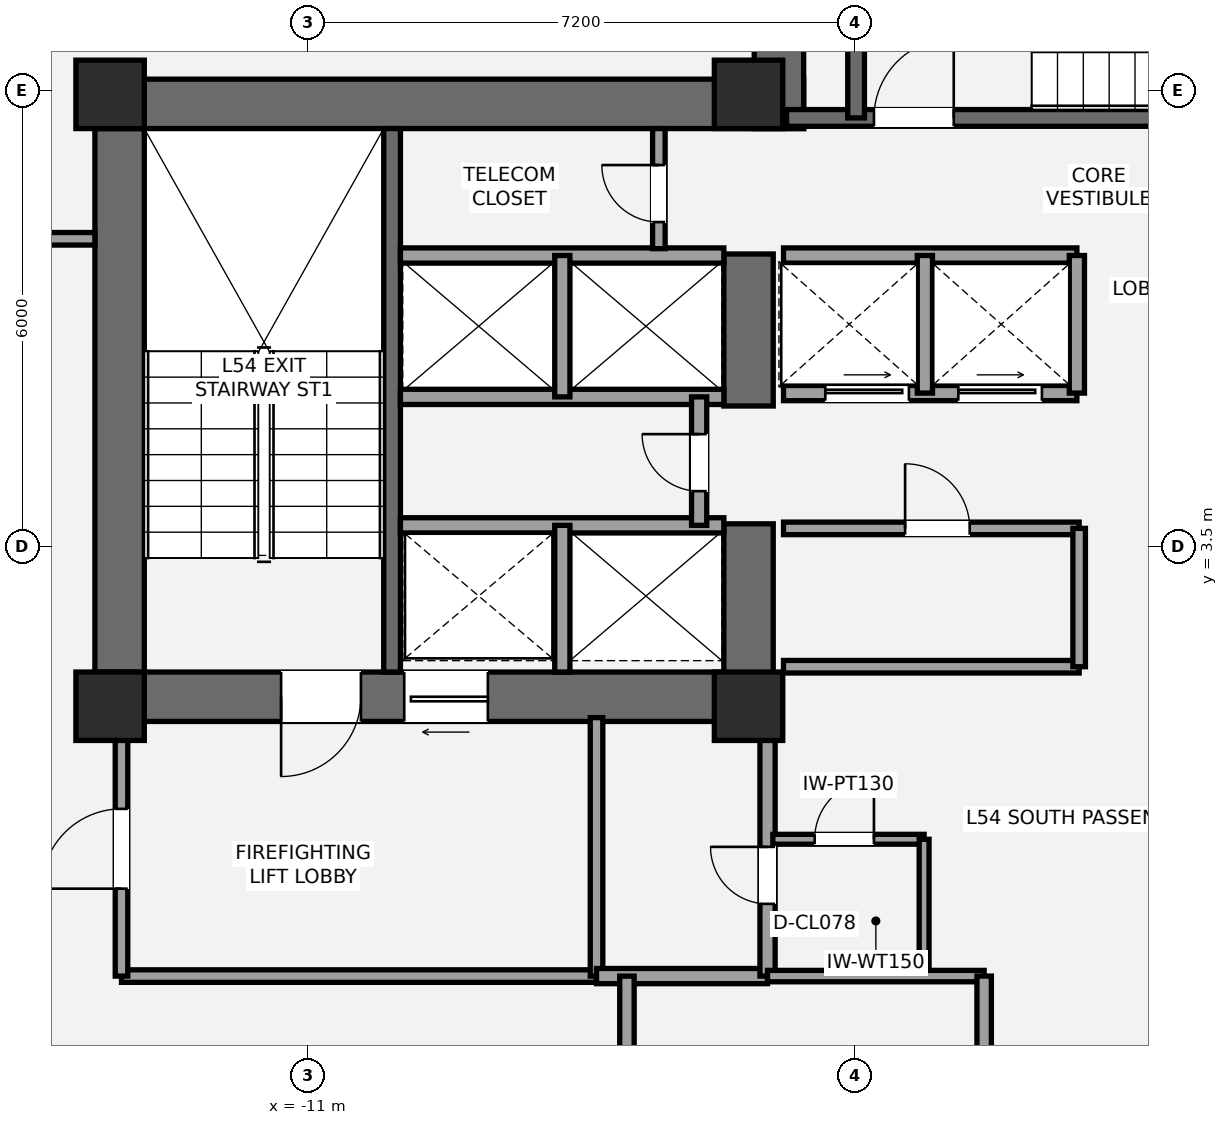
"""IFC4 building model, lengths in metres.
Left out: names, types, materials, properties, quantities, classifications, styles, units other than length and angle.
Written with IfcOpenShell. Run it as: python <this file> out.ifc"""

import sys

from ifc_helpers import new_model, si_unit, direction, frame, frame_2d, origin, origin_2d, place, context, subcontext, project, spatial, rectangle, extrude, element, fill, save


model = new_model("IFC4")
c1 = context("Model", 3, precision=1e-05, world=origin(), true_north=direction((0.0, 1.0)))
c2 = subcontext(c1, "Body", "Model", "MODEL_VIEW")
j1 = project(units=[si_unit("LENGTHUNIT", "METRE"), si_unit("PLANEANGLEUNIT", "RADIAN")], contexts=[c1])
p1 = place(None, origin())
s1 = spatial("IfcSite", under=j1, at=p1, CompositionType="ELEMENT")
p2 = place(p1, origin())
s2 = spatial("IfcBuilding", under=s1, at=p2, CompositionType="ELEMENT")
p3 = place(p2, frame((0.0, 0.0, 195.0)))
s3 = spatial("IfcBuildingStorey", under=s2, at=p3, CompositionType="ELEMENT", Elevation=195.0)
p4 = place(p3, frame((-13.475, 1.2, 0.0), z_axis=(0.0, 0.0, 1.0), x_axis=(0.0, 1.0, 0.0)))
e1 = element("IfcWall", 1, at=p4, inside=s3, PredefinedType="SHEAR", context=c2, shape_type="SweptSolid", body=[
    extrude(rectangle(XDim=8.45, YDim=0.65, at=frame_2d((4.225, 0.0))), origin(), (0.0, 0.0, 1.0), 3.2),
])
p5 = place(p3, frame((-13.8, 9.325, 0.0), z_axis=(0.0, 0.0, 1.0), x_axis=(1.0, 0.0, 0.0)))
e2 = element("IfcWall", 2, at=p5, inside=s3, PredefinedType="SHEAR", context=c2, shape_type="SweptSolid", body=[
    extrude(rectangle(XDim=9.325, YDim=0.65, at=frame_2d((4.663, 0.0))), origin(), (0.0, 0.0, 1.0), 3.2),
])
p6 = place(p3, frame((-4.875, 1.525, 0.0), z_axis=(0.0, 0.0, 1.0), x_axis=(-1.0, 0.0, 0.0)))
e3 = element("IfcWall", 3, at=p6, inside=s3, PredefinedType="SHEAR", context=c2, shape_type="SweptSolid", body=[
    extrude(rectangle(XDim=8.925, YDim=0.65, at=frame_2d((4.462, 0.0))), origin(), (0.0, 0.0, 1.0), 3.2),
])
p7 = place(p6, frame((5.425, 0.0, 0.0)))
e4 = element("IfcOpeningElement", 4, at=p7, cuts=e3, PredefinedType="OPENING", context=c2, shape_type="SweptSolid", body=[
    extrude(rectangle(XDim=1.05, YDim=2.15, at=frame_2d((0.525, 1.075))), frame((0.0, 0.335, 0.0), z_axis=(0.0, -1.0, 0.0), x_axis=(1.0, 0.0, 0.0)), (0.0, 0.0, 1.0), 0.67),
])
p8 = place(p6, frame((3.755, 0.0, 0.0)))
e5 = element("IfcOpeningElement", 5, at=p8, cuts=e3, PredefinedType="OPENING", context=c2, shape_type="SweptSolid", body=[
    extrude(rectangle(XDim=1.1, YDim=2.2, at=frame_2d((0.55, 1.1))), frame((0.0, 0.335, 0.0), z_axis=(0.0, -1.0, 0.0), x_axis=(1.0, 0.0, 0.0)), (0.0, 0.0, 1.0), 0.67),
])
p9 = place(p3, frame((-5.2, 1.2, 0.0), z_axis=(0.0, 0.0, 1.0), x_axis=(0.0, 1.0, 0.0)))
e6 = element("IfcWall", 6, at=p9, inside=s3, PredefinedType="SHEAR", context=c2, shape_type="SweptSolid", body=[
    extrude(rectangle(XDim=2.6, YDim=0.65, at=frame_2d((1.3, 0.0))), origin(), (0.0, 0.0, 1.0), 3.2),
])
p10 = place(p3, frame((-5.2, 5.35, 0.0), z_axis=(0.0, 0.0, 1.0), x_axis=(0.0, 1.0, 0.0)))
e7 = element("IfcWall", 7, at=p10, inside=s3, PredefinedType="SHEAR", context=c2, shape_type="SweptSolid", body=[
    extrude(rectangle(XDim=2.0, YDim=0.65, at=frame_2d((1.0, 0.0))), origin(), (0.0, 0.0, 1.0), 3.2),
])
p11 = place(p3, frame((-9.89, 1.85, 0.0), z_axis=(0.0, 0.0, 1.0), x_axis=(0.0, 1.0, 0.0)))
e8 = element("IfcWall", 8, at=p11, inside=s3, PredefinedType="SHEAR", context=c2, shape_type="SweptSolid", body=[
    extrude(rectangle(XDim=7.15, YDim=0.22, at=frame_2d((3.575, 0.0))), origin(), (0.0, 0.0, 1.0), 3.2),
])
p12 = place(p3, frame((-4.8, 9.0, 0.0), z_axis=(0.0, 0.0, 1.0), x_axis=(0.0, 1.0, 0.0)))
e9 = element("IfcWall", 9, at=p12, inside=s3, PredefinedType="SHEAR", context=c2, shape_type="SweptSolid", body=[
    extrude(rectangle(XDim=4.05, YDim=0.65, at=frame_2d((2.025, 0.0))), origin(), (0.0, 0.0, 1.0), 3.2),
])
p13 = place(p3, frame((-4.7, 9.14, 0.0), z_axis=(0.0, 0.0, 1.0), x_axis=(1.0, 0.0, 0.0)))
e10 = element("IfcWall", 10, at=p13, inside=s3, PredefinedType="SHEAR", context=c2, shape_type="SweptSolid", body=[
    extrude(rectangle(XDim=9.3, YDim=0.22, at=frame_2d((4.65, 0.0))), origin(), (0.0, 0.0, 1.0), 3.2),
])
p14 = place(p13, frame((1.15, 0.0, 0.0)))
e11 = element("IfcOpeningElement", 11, at=p14, cuts=e10, PredefinedType="OPENING", context=c2, shape_type="SweptSolid", body=[
    extrude(rectangle(XDim=1.05, YDim=2.15, at=frame_2d((0.525, 1.075))), frame((0.0, 0.12, 0.0), z_axis=(0.0, -1.0, 0.0), x_axis=(1.0, 0.0, 0.0)), (0.0, 0.0, 1.0), 0.24),
])
p15 = place(p3, frame((-3.785, 9.14, 0.0), z_axis=(0.0, 0.0, 1.0), x_axis=(0.0, 1.0, 0.0)))
e12 = element("IfcWall", 12, at=p15, inside=s3, PredefinedType="SHEAR", context=c2, shape_type="SweptSolid", body=[
    extrude(rectangle(XDim=3.26, YDim=0.22, at=frame_2d((1.63, 0.0))), origin(), (0.0, 0.0, 1.0), 3.2),
])
for number, where, z_axis, x_axis in (
    (13, (-13.6, 1.4, 0.0), (0.0, 0.0, 1.0), (1.0, 0.0, 0.0)),
    (14, (-13.6, 9.45, 0.0), (0.0, 0.0, 1.0), (1.0, 0.0, 0.0)),
    (15, (-5.2, 1.4, 0.0), (0.0, 0.0, 1.0), (1.0, 0.0, 0.0)),
    (16, (-5.2, 9.45, 0.0), (0.0, 0.0, 1.0), (1.0, 0.0, 0.0)),
):
    element("IfcColumn", number, at=place(p3, frame(where, z_axis=z_axis, x_axis=x_axis)), inside=s3, PredefinedType="COLUMN", context=c2, shape_type="SweptSolid", body=[
        extrude(rectangle(XDim=0.9, YDim=0.9, at=origin_2d()), origin(), (0.0, 0.0, 1.0), 3.2),
    ])
p16 = place(p3, frame((-13.45, -2.15, 0.0), z_axis=(0.0, 0.0, 1.0), x_axis=(1.0, 0.0, 0.0)))
e17 = element("IfcWall", 17, at=p16, inside=s3, PredefinedType="PARTITIONING", context=c2, shape_type="SweptSolid", body=[
    extrude(rectangle(XDim=6.25, YDim=0.165, at=frame_2d((3.125, 0.0))), origin(), (0.0, 0.0, 1.0), 3.02),
])
p17 = place(p3, frame((-13.45, -2.15, 0.0), z_axis=(0.0, 0.0, 1.0), x_axis=(0.0, 1.0, 0.0)))
e18 = element("IfcWall", 18, at=p17, inside=s3, PredefinedType="PARTITIONING", context=c2, shape_type="SweptSolid", body=[
    extrude(rectangle(XDim=3.4, YDim=0.165, at=frame_2d((1.7, 0.0))), origin(), (0.0, 0.0, 1.0), 2.473),
])
p18 = place(p17, frame((1.15, 0.0, 0.0)))
e19 = element("IfcOpeningElement", 19, at=p18, cuts=e18, PredefinedType="OPENING", context=c2, shape_type="SweptSolid", body=[
    extrude(rectangle(XDim=1.05, YDim=2.15, at=frame_2d((0.525, 1.075))), frame((0.0, 0.093, 0.0), z_axis=(0.0, -1.0, 0.0), x_axis=(1.0, 0.0, 0.0)), (0.0, 0.0, 1.0), 0.185),
])
p19 = place(p3, frame((-7.2, -2.15, 0.0), z_axis=(0.0, 0.0, 1.0), x_axis=(0.0, 1.0, 0.0)))
e20 = element("IfcWall", 20, at=p19, inside=s3, PredefinedType="PARTITIONING", context=c2, shape_type="SweptSolid", body=[
    extrude(rectangle(XDim=3.4, YDim=0.165, at=frame_2d((1.7, 0.0))), origin(), (0.0, 0.0, 1.0), 2.473),
])
p20 = place(p3, frame((-7.2, -2.15, 0.0), z_axis=(0.0, 0.0, 1.0), x_axis=(1.0, 0.0, 0.0)))
e21 = element("IfcWall", 21, at=p20, inside=s3, PredefinedType="SOLIDWALL", context=c2, shape_type="SweptSolid", body=[
    extrude(rectangle(XDim=2.25, YDim=0.2, at=frame_2d((1.125, 0.0))), origin(), (0.0, 0.0, 1.0), 3.02),
])
p21 = place(p3, frame((-4.95, -2.15, 0.0), z_axis=(0.0, 0.0, 1.0), x_axis=(0.0, 1.0, 0.0)))
e22 = element("IfcWall", 22, at=p21, inside=s3, PredefinedType="SOLIDWALL", context=c2, shape_type="SweptSolid", body=[
    extrude(rectangle(XDim=3.4, YDim=0.2, at=frame_2d((1.7, 0.0))), origin(), (0.0, 0.0, 1.0), 2.473),
])
p22 = place(p21, frame((0.95, 0.0, 0.0)))
e23 = element("IfcOpeningElement", 23, at=p22, cuts=e22, PredefinedType="OPENING", context=c2, shape_type="SweptSolid", body=[
    extrude(rectangle(XDim=0.75, YDim=2.1, at=frame_2d((0.375, 1.05))), frame((0.0, 0.11, 0.0), z_axis=(0.0, -1.0, 0.0), x_axis=(1.0, 0.0, 0.0)), (0.0, 0.0, 1.0), 0.22),
])
p23 = place(p3, frame((-4.88, -0.35, 0.0), z_axis=(0.0, 0.0, 1.0), x_axis=(1.0, 0.0, 0.0)))
e24 = element("IfcWall", 24, at=p23, inside=s3, PredefinedType="PARTITIONING", context=c2, shape_type="SweptSolid", body=[
    extrude(rectangle(XDim=1.99, YDim=0.13, at=frame_2d((0.995, 0.0))), origin(), (0.0, 0.0, 1.0), 3.02),
])
p24 = place(p23, frame((0.55, 0.0, 0.0)))
e25 = element("IfcOpeningElement", 25, at=p24, cuts=e24, PredefinedType="OPENING", context=c2, shape_type="SweptSolid", body=[
    extrude(rectangle(XDim=0.78, YDim=2.1, at=frame_2d((0.39, 1.05))), frame((0.0, 0.075, 0.0), z_axis=(0.0, -1.0, 0.0), x_axis=(1.0, 0.0, 0.0)), (0.0, 0.0, 1.0), 0.15),
])
p25 = place(p3, frame((-2.89, -2.15, 0.0), z_axis=(0.0, 0.0, 1.0), x_axis=(0.0, 1.0, 0.0)))
e26 = element("IfcWall", 26, at=p25, inside=s3, PredefinedType="PARTITIONING", context=c2, shape_type="SweptSolid", body=[
    extrude(rectangle(XDim=1.8, YDim=0.13, at=frame_2d((0.9, 0.0))), origin(), (0.0, 0.0, 1.0), 3.02),
])
p26 = place(p3, frame((-9.78, 3.78, 0.0), z_axis=(0.0, 0.0, 1.0), x_axis=(1.0, 0.0, 0.0)))
e27 = element("IfcWall", 27, at=p26, inside=s3, PredefinedType="SOLIDWALL", context=c2, shape_type="SweptSolid", body=[
    extrude(rectangle(XDim=4.255, YDim=0.2, at=frame_2d((2.127, 0.0))), origin(), (0.0, 0.0, 1.0), 3.02),
])
p27 = place(p3, frame((-7.65, 1.85, 0.0), z_axis=(0.0, 0.0, 1.0), x_axis=(0.0, 1.0, 0.0)))
e28 = element("IfcWall", 28, at=p27, inside=s3, PredefinedType="SOLIDWALL", context=c2, shape_type="SweptSolid", body=[
    extrude(rectangle(XDim=1.93, YDim=0.2, at=frame_2d((0.965, 0.0))), origin(), (0.0, 0.0, 1.0), 3.02),
])
for number, where, z_axis, x_axis in (
    (29, (-9.78, 5.47, 0.0), (0.0, 0.0, 1.0), (1.0, 0.0, 0.0)),
    (30, (-9.78, 7.33, 0.0), (0.0, 0.0, 1.0), (1.0, 0.0, 0.0)),
):
    element("IfcWall", number, at=place(p3, frame(where, z_axis=z_axis, x_axis=x_axis)), inside=s3, PredefinedType="SOLIDWALL", context=c2, shape_type="SweptSolid", body=[
        extrude(rectangle(XDim=4.255, YDim=0.2, at=frame_2d((2.127, 0.0))), origin(), (0.0, 0.0, 1.0), 3.02),
    ])
p28 = place(p3, frame((-7.65, 5.47, 0.0), z_axis=(0.0, 0.0, 1.0), x_axis=(0.0, 1.0, 0.0)))
e31 = element("IfcWall", 31, at=p28, inside=s3, PredefinedType="SOLIDWALL", context=c2, shape_type="SweptSolid", body=[
    extrude(rectangle(XDim=1.86, YDim=0.2, at=frame_2d((0.93, 0.0))), origin(), (0.0, 0.0, 1.0), 3.02),
])
p29 = place(p3, frame((-5.85, 3.78, 0.0), z_axis=(0.0, 0.0, 1.0), x_axis=(0.0, 1.0, 0.0)))
e32 = element("IfcWall", 32, at=p29, inside=s3, PredefinedType="SOLIDWALL", context=c2, shape_type="SweptSolid", body=[
    extrude(rectangle(XDim=1.69, YDim=0.2, at=frame_2d((0.845, 0.0))), origin(), (0.0, 0.0, 1.0), 3.02),
])
p30 = place(p29, frame((0.45, 0.0, 0.0)))
e33 = element("IfcOpeningElement", 33, at=p30, cuts=e32, PredefinedType="OPENING", context=c2, shape_type="SweptSolid", body=[
    extrude(rectangle(XDim=0.75, YDim=2.1, at=frame_2d((0.375, 1.05))), frame((0.0, 0.11, 0.0), z_axis=(0.0, -1.0, 0.0), x_axis=(1.0, 0.0, 0.0)), (0.0, 0.0, 1.0), 0.22),
])
p31 = place(p3, frame((-4.74, 1.92, 0.0), z_axis=(0.0, 0.0, 1.0), x_axis=(1.0, 0.0, 0.0)))
e34 = element("IfcWall", 34, at=p31, inside=s3, PredefinedType="PARTITIONING", context=c2, shape_type="SweptSolid", body=[
    extrude(rectangle(XDim=3.89, YDim=0.165, at=frame_2d((1.945, 0.0))), origin(), (0.0, 0.0, 1.0), 2.16),
])
p32 = place(p3, frame((-4.74, 3.74, 0.0), z_axis=(0.0, 0.0, 1.0), x_axis=(1.0, 0.0, 0.0)))
e35 = element("IfcWall", 35, at=p32, inside=s3, PredefinedType="PARTITIONING", context=c2, shape_type="SweptSolid", body=[
    extrude(rectangle(XDim=3.89, YDim=0.165, at=frame_2d((1.945, 0.0))), origin(), (0.0, 0.0, 1.0), 3.02),
])
p33 = place(p32, frame((1.6, 0.0, 0.0)))
e36 = element("IfcOpeningElement", 36, at=p33, cuts=e35, PredefinedType="OPENING", context=c2, shape_type="SweptSolid", body=[
    extrude(rectangle(XDim=0.85, YDim=2.1, at=frame_2d((0.425, 1.05))), frame((0.0, 0.093, 0.0), z_axis=(0.0, -1.0, 0.0), x_axis=(1.0, 0.0, 0.0)), (0.0, 0.0, 1.0), 0.185),
])
p34 = place(p3, frame((-0.85, 1.92, 0.0), z_axis=(0.0, 0.0, 1.0), x_axis=(0.0, 1.0, 0.0)))
e37 = element("IfcWall", 37, at=p34, inside=s3, PredefinedType="PARTITIONING", context=c2, shape_type="SweptSolid", body=[
    extrude(rectangle(XDim=1.82, YDim=0.165, at=frame_2d((0.91, 0.0))), origin(), (0.0, 0.0, 1.0), 3.02),
])
p35 = place(p3, frame((-4.74, 5.52, 0.0), z_axis=(0.0, 0.0, 1.0), x_axis=(1.0, 0.0, 0.0)))
e38 = element("IfcWall", 38, at=p35, inside=s3, PredefinedType="SOLIDWALL", context=c2, shape_type="SweptSolid", body=[
    extrude(rectangle(XDim=3.86, YDim=0.2, at=frame_2d((1.93, 0.0))), origin(), (0.0, 0.0, 1.0), 3.02),
])
p36 = place(p35, frame((0.55, 0.0, 0.0)))
e39 = element("IfcOpeningElement", 39, at=p36, cuts=e38, PredefinedType="OPENING", context=c2, shape_type="SweptSolid", body=[
    extrude(rectangle(XDim=1.1, YDim=2.2, at=frame_2d((0.55, 1.1))), frame((0.0, 0.11, 0.0), z_axis=(0.0, -1.0, 0.0), x_axis=(1.0, 0.0, 0.0)), (0.0, 0.0, 1.0), 0.22),
])
p37 = place(p35, frame((2.3, 0.0, 0.0)))
e40 = element("IfcOpeningElement", 40, at=p37, cuts=e38, PredefinedType="OPENING", context=c2, shape_type="SweptSolid", body=[
    extrude(rectangle(XDim=1.1, YDim=2.2, at=frame_2d((0.55, 1.1))), frame((0.0, 0.11, 0.0), z_axis=(0.0, -1.0, 0.0), x_axis=(1.0, 0.0, 0.0)), (0.0, 0.0, 1.0), 0.22),
])
p38 = place(p3, frame((-4.74, 7.33, 0.0), z_axis=(0.0, 0.0, 1.0), x_axis=(1.0, 0.0, 0.0)))
e41 = element("IfcWall", 41, at=p38, inside=s3, PredefinedType="SOLIDWALL", context=c2, shape_type="SweptSolid", body=[
    extrude(rectangle(XDim=3.86, YDim=0.2, at=frame_2d((1.93, 0.0))), origin(), (0.0, 0.0, 1.0), 3.02),
])
for number, where, z_axis, x_axis in (
    (42, (-2.88, 5.52, 0.0), (0.0, 0.0, 1.0), (0.0, 1.0, 0.0)),
    (43, (-0.88, 5.52, 0.0), (0.0, 0.0, 1.0), (0.0, 1.0, 0.0)),
):
    element("IfcWall", number, at=place(p3, frame(where, z_axis=z_axis, x_axis=x_axis)), inside=s3, PredefinedType="SOLIDWALL", context=c2, shape_type="SweptSolid", body=[
        extrude(rectangle(XDim=1.81, YDim=0.2, at=frame_2d((0.905, 0.0))), origin(), (0.0, 0.0, 1.0), 3.02),
    ])
p39 = place(p3, frame((-6.38, 7.42, 0.0), z_axis=(0.0, 0.0, 1.0), x_axis=(0.0, 1.0, 0.0)))
e44 = element("IfcWall", 44, at=p39, inside=s3, PredefinedType="PARTITIONING", context=c2, shape_type="SweptSolid", body=[
    extrude(rectangle(XDim=1.58, YDim=0.165, at=frame_2d((0.79, 0.0))), origin(), (0.0, 0.0, 1.0), 3.02),
])
p40 = place(p39, frame((0.35, 0.0, 0.0)))
e45 = element("IfcOpeningElement", 45, at=p40, cuts=e44, PredefinedType="OPENING", context=c2, shape_type="SweptSolid", body=[
    extrude(rectangle(XDim=0.75, YDim=2.1, at=frame_2d((0.375, 1.05))), frame((0.0, 0.093, 0.0), z_axis=(0.0, -1.0, 0.0), x_axis=(1.0, 0.0, 0.0)), (0.0, 0.0, 1.0), 0.185),
])
p41 = place(p3, frame((-4.95, -2.15, 0.0), z_axis=(0.0, 0.0, 1.0), x_axis=(1.0, 0.0, 0.0)))
e46 = element("IfcWall", 46, at=p41, inside=s3, PredefinedType="PLUMBINGWALL", context=c2, shape_type="SweptSolid", body=[
    extrude(rectangle(XDim=2.85, YDim=0.15, at=frame_2d((1.425, 0.0))), origin(), (0.0, 0.0, 1.0), 3.02),
])
p42 = place(p3, frame((-6.8, -4.05, 0.0), z_axis=(0.0, 0.0, 1.0), x_axis=(0.0, 1.0, 0.0)))
e47 = element("IfcWall", 47, at=p42, inside=s3, PredefinedType="PLUMBINGWALL", context=c2, shape_type="SweptSolid", body=[
    extrude(rectangle(XDim=1.9, YDim=0.19, at=frame_2d((0.95, 0.0))), origin(), (0.0, 0.0, 1.0), 2.473),
])
p43 = place(p3, frame((-2.1, -4.05, 0.0), z_axis=(0.0, 0.0, 1.0), x_axis=(0.0, 1.0, 0.0)))
e48 = element("IfcWall", 48, at=p43, inside=s3, PredefinedType="PLUMBINGWALL", context=c2, shape_type="SweptSolid", body=[
    extrude(rectangle(XDim=1.9, YDim=0.19, at=frame_2d((0.95, 0.0))), origin(), (0.0, 0.0, 1.0), 3.02),
])
p44 = place(p3, frame((-16.8, 7.55, 0.0), z_axis=(0.0, 0.0, 1.0), x_axis=(1.0, 0.0, 0.0)))
e49 = element("IfcWall", 49, at=p44, inside=s3, PredefinedType="PARTITIONING", context=c2, shape_type="SweptSolid", body=[
    extrude(rectangle(XDim=3.0, YDim=0.165, at=frame_2d((1.5, 0.0))), origin(), (0.0, 0.0, 1.0), 2.473),
])
p45 = place(p44, frame((0.3, 0.0, 0.0)))
e50 = element("IfcOpeningElement", 50, at=p45, cuts=e49, PredefinedType="OPENING", context=c2, shape_type="SweptSolid", body=[
    extrude(rectangle(XDim=1.0, YDim=2.15, at=frame_2d((0.5, 1.075))), frame((0.0, 0.093, 0.0), z_axis=(0.0, -1.0, 0.0), x_axis=(1.0, 0.0, 0.0)), (0.0, 0.0, 1.0), 0.185),
])
p46 = place(p7, origin())
e51 = element("IfcDoor", 51, at=p46, inside=s3, OperationType="SINGLE_SWING_RIGHT", PredefinedType="DOOR", context=c2, shape_type="SweptSolid", body=[
    extrude(rectangle(XDim=1.05, YDim=2.15, at=frame_2d((0.525, 1.075))), frame((0.0, 0.025, 0.0), z_axis=(0.0, -1.0, 0.0), x_axis=(1.0, 0.0, 0.0)), (0.0, 0.0, 1.0), 0.05),
])
fill(e4, e51)
p47 = place(p14, origin())
e52 = element("IfcDoor", 52, at=p47, inside=s3, OperationType="SINGLE_SWING_RIGHT", PredefinedType="DOOR", context=c2, shape_type="SweptSolid", body=[
    extrude(rectangle(XDim=1.05, YDim=2.15, at=frame_2d((0.525, 1.075))), frame((0.0, 0.025, 0.0), z_axis=(0.0, -1.0, 0.0), x_axis=(1.0, 0.0, 0.0)), (0.0, 0.0, 1.0), 0.05),
])
fill(e11, e52)
p48 = place(p18, origin())
e53 = element("IfcDoor", 53, at=p48, inside=s3, OperationType="SINGLE_SWING_LEFT", PredefinedType="DOOR", context=c2, shape_type="SweptSolid", body=[
    extrude(rectangle(XDim=1.05, YDim=2.15, at=frame_2d((0.525, 1.075))), frame((0.0, 0.025, 0.0), z_axis=(0.0, -1.0, 0.0), x_axis=(1.0, 0.0, 0.0)), (0.0, 0.0, 1.0), 0.05),
])
fill(e19, e53)
p49 = place(p22, origin())
e54 = element("IfcDoor", 54, at=p49, inside=s3, OperationType="SINGLE_SWING_RIGHT", PredefinedType="DOOR", context=c2, shape_type="SweptSolid", body=[
    extrude(rectangle(XDim=0.75, YDim=2.1, at=frame_2d((0.375, 1.05))), frame((0.0, 0.025, 0.0), z_axis=(0.0, -1.0, 0.0), x_axis=(1.0, 0.0, 0.0)), (0.0, 0.0, 1.0), 0.05),
])
fill(e23, e54)
p50 = place(p24, origin())
e55 = element("IfcDoor", 55, at=p50, inside=s3, OperationType="SINGLE_SWING_RIGHT", PredefinedType="DOOR", context=c2, shape_type="SweptSolid", body=[
    extrude(rectangle(XDim=0.78, YDim=2.1, at=frame_2d((0.39, 1.05))), frame((0.0, 0.025, 0.0), z_axis=(0.0, -1.0, 0.0), x_axis=(1.0, 0.0, 0.0)), (0.0, 0.0, 1.0), 0.05),
])
fill(e25, e55)
p51 = place(p8, origin())
e56 = element("IfcDoor", 56, at=p51, inside=s3, OperationType="SLIDING_TO_LEFT", PredefinedType="DOOR", context=c2, shape_type="SweptSolid", body=[
    extrude(rectangle(XDim=1.1, YDim=2.2, at=frame_2d((0.55, 1.1))), frame((0.0, 0.025, 0.0), z_axis=(0.0, -1.0, 0.0), x_axis=(1.0, 0.0, 0.0)), (0.0, 0.0, 1.0), 0.05),
])
fill(e5, e56)
p52 = place(p30, origin())
e57 = element("IfcDoor", 57, at=p52, inside=s3, OperationType="SINGLE_SWING_RIGHT", PredefinedType="DOOR", context=c2, shape_type="SweptSolid", body=[
    extrude(rectangle(XDim=0.75, YDim=2.1, at=frame_2d((0.375, 1.05))), frame((0.0, 0.025, 0.0), z_axis=(0.0, -1.0, 0.0), x_axis=(1.0, 0.0, 0.0)), (0.0, 0.0, 1.0), 0.05),
])
fill(e33, e57)
p53 = place(p33, origin())
e58 = element("IfcDoor", 58, at=p53, inside=s3, OperationType="SINGLE_SWING_LEFT", PredefinedType="DOOR", context=c2, shape_type="SweptSolid", body=[
    extrude(rectangle(XDim=0.85, YDim=2.1, at=frame_2d((0.425, 1.05))), frame((0.0, 0.025, 0.0), z_axis=(0.0, -1.0, 0.0), x_axis=(1.0, 0.0, 0.0)), (0.0, 0.0, 1.0), 0.05),
])
fill(e36, e58)
p54 = place(p36, origin())
e59 = element("IfcDoor", 59, at=p54, inside=s3, OperationType="SLIDING_TO_LEFT", PredefinedType="DOOR", context=c2, shape_type="SweptSolid", body=[
    extrude(rectangle(XDim=1.1, YDim=2.2, at=frame_2d((0.55, 1.1))), frame((0.0, 0.025, 0.0), z_axis=(0.0, -1.0, 0.0), x_axis=(1.0, 0.0, 0.0)), (0.0, 0.0, 1.0), 0.05),
])
fill(e39, e59)
p55 = place(p37, origin())
e60 = element("IfcDoor", 60, at=p55, inside=s3, OperationType="SLIDING_TO_LEFT", PredefinedType="DOOR", context=c2, shape_type="SweptSolid", body=[
    extrude(rectangle(XDim=1.1, YDim=2.2, at=frame_2d((0.55, 1.1))), frame((0.0, 0.025, 0.0), z_axis=(0.0, -1.0, 0.0), x_axis=(1.0, 0.0, 0.0)), (0.0, 0.0, 1.0), 0.05),
])
fill(e40, e60)
p56 = place(p40, origin())
e61 = element("IfcDoor", 61, at=p56, inside=s3, OperationType="SINGLE_SWING_RIGHT", PredefinedType="DOOR", context=c2, shape_type="SweptSolid", body=[
    extrude(rectangle(XDim=0.75, YDim=2.1, at=frame_2d((0.375, 1.05))), frame((0.0, 0.025, 0.0), z_axis=(0.0, -1.0, 0.0), x_axis=(1.0, 0.0, 0.0)), (0.0, 0.0, 1.0), 0.05),
])
fill(e45, e61)
save(model, sys.argv[1])
